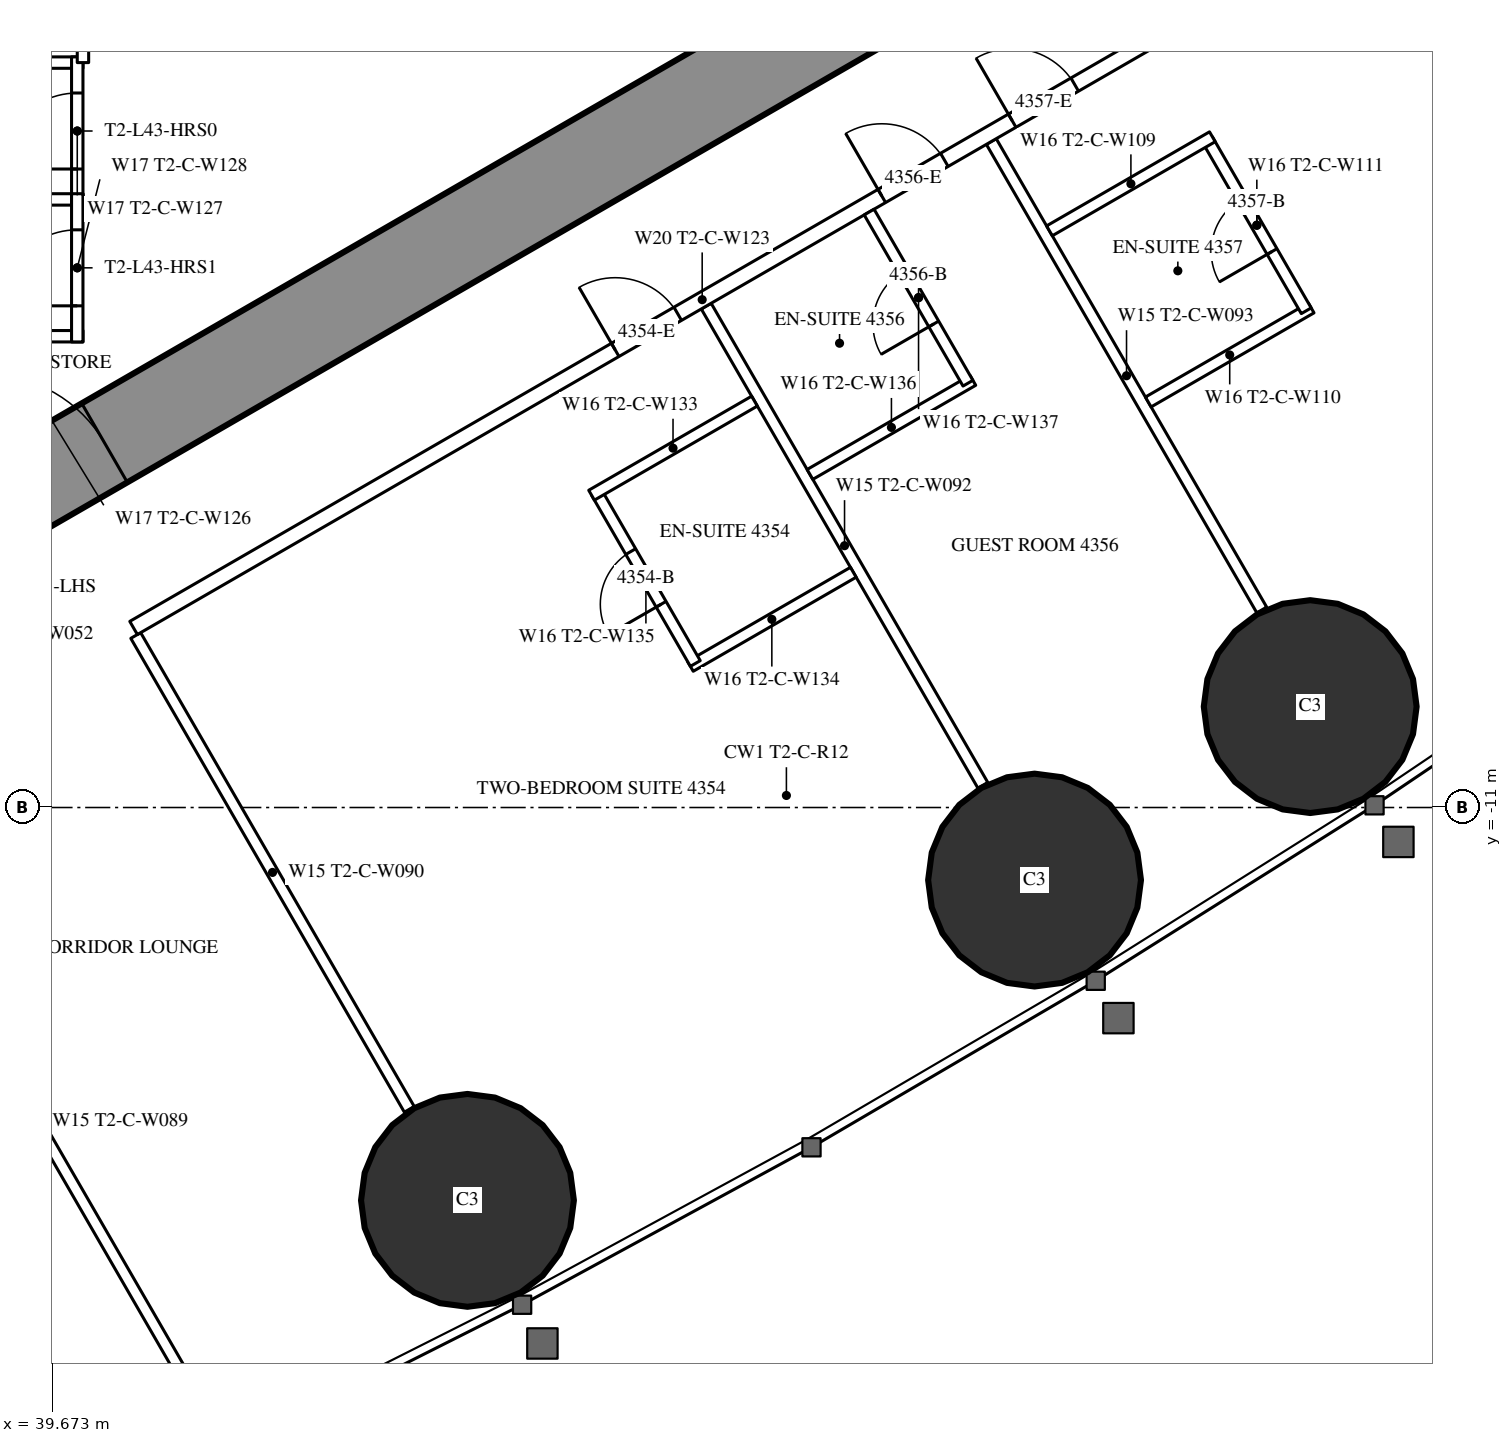
"""IFC4 building model, lengths in metres.
Left out: names, types, materials, properties, quantities, classifications, styles, units other than length and angle.
Written with IfcOpenShell. Run it as: python <this file> out.ifc"""

import sys

from ifc_helpers import new_model, si_unit, direction, frame, frame_2d, origin, origin_2d, place, context, subcontext, project, spatial, rectangle, circle, extrude, element, fill, save


model = new_model("IFC4")
c1 = context("Model", 3, precision=1e-05, world=origin(), true_north=direction((0.0, 1.0)))
c2 = subcontext(c1, "Body", "Model", "MODEL_VIEW")
j1 = project(units=[si_unit("LENGTHUNIT", "METRE"), si_unit("PLANEANGLEUNIT", "RADIAN")], contexts=[c1])
p1 = place(None, origin())
s1 = spatial("IfcSite", under=j1, at=p1, CompositionType="ELEMENT")
p2 = place(p1, origin())
s2 = spatial("IfcBuilding", under=s1, at=p2, CompositionType="ELEMENT")
p3 = place(p2, frame((0.0, 0.0, 163.3)))
s3 = spatial("IfcBuildingStorey", under=s2, at=p3, CompositionType="ELEMENT", Elevation=163.3)
for number, where, z_axis, x_axis in (
    (1, (45.134, -16.168, 0.0), (0.0, 0.0, 1.0), (1.0, 0.0, 0.0)),
    (2, (52.594, -11.955, 0.0), (0.0, 0.0, 1.0), (1.0, 0.0, 0.0)),
    (3, (56.221, -9.672, 0.0), (0.0, 0.0, 1.0), (1.0, 0.0, 0.0)),
):
    element("IfcColumn", number, at=place(p3, frame(where, z_axis=z_axis, x_axis=x_axis)), inside=s3, PredefinedType="COLUMN", context=c2, shape_type="SweptSolid", body=[
        extrude(circle(Radius=1.4, at=origin_2d()), origin(), (0.0, 0.0, 1.0), 3.5),
    ])
p4 = place(p3, frame((27.2, -13.8, 0.0), z_axis=(0.0, 0.0, 1.0), x_axis=(0.866027159892, 0.499996958321, 0.0)))
e4 = element("IfcWall", 4, at=p4, inside=s3, PredefinedType="SHEAR", context=c2, shape_type="SweptSolid", body=[
    extrude(rectangle(XDim=27.947, YDim=1.2, at=frame_2d((13.973, 0.0))), origin(), (0.0, 0.0, 1.0), 3.5),
])
p5 = place(p4, frame((4.6, 0.0, 0.0)))
e5 = element("IfcOpeningElement", 5, at=p5, cuts=e4, PredefinedType="OPENING", context=c2, shape_type="SweptSolid", body=[
    extrude(rectangle(XDim=1.0, YDim=2.2, at=frame_2d((0.5, 1.1))), frame((0.0, 0.61, 0.0), z_axis=(0.0, -1.0, 0.0), x_axis=(1.0, 0.0, 0.0)), (0.0, 0.0, 1.0), 1.22),
])
p6 = place(p4, frame((13.395, 0.0, 0.0)))
e6 = element("IfcOpeningElement", 6, at=p6, cuts=e4, PredefinedType="OPENING", context=c2, shape_type="SweptSolid", body=[
    extrude(rectangle(XDim=1.8, YDim=2.2, at=frame_2d((0.9, 1.1))), frame((0.0, 0.61, 0.0), z_axis=(0.0, -1.0, 0.0), x_axis=(1.0, 0.0, 0.0)), (0.0, 0.0, 1.0), 1.22),
])
p7 = place(p3, frame((37.022, -10.9, 0.0), z_axis=(0.0, 0.0, 1.0), x_axis=(0.499998620953, -0.866026199976, 0.0)))
e7 = element("IfcWall", 7, at=p7, inside=s3, PredefinedType="PARTITIONING", context=c2, shape_type="SweptSolid", body=[
    extrude(rectangle(XDim=9.77, YDim=0.15, at=frame_2d((4.885, 0.0))), origin(), (0.0, 0.0, 1.0), 3.25),
])
p8 = place(p3, frame((40.769, -8.737, 0.0), z_axis=(0.0, 0.0, 1.0), x_axis=(0.500013115284, -0.866017831539, 0.0)))
e8 = element("IfcWall", 8, at=p8, inside=s3, PredefinedType="PARTITIONING", context=c2, shape_type="SweptSolid", body=[
    extrude(rectangle(XDim=7.198, YDim=0.15, at=frame_2d((3.599, 0.0))), origin(), (0.0, 0.0, 1.0), 2.3),
])
p9 = place(p3, frame((48.275, -4.404, 0.0), z_axis=(0.0, 0.0, 1.0), x_axis=(0.500006004368, -0.866021937133, 0.0)))
e9 = element("IfcWall", 9, at=p9, inside=s3, PredefinedType="PARTITIONING", context=c2, shape_type="SweptSolid", body=[
    extrude(rectangle(XDim=7.279, YDim=0.15, at=frame_2d((3.64, 0.0))), origin(), (0.0, 0.0, 1.0), 2.3),
])
p10 = place(p3, frame((52.025, -2.238, 0.0), z_axis=(0.0, 0.0, 1.0), x_axis=(0.499983785035, -0.866034765296, 0.0)))
e10 = element("IfcWall", 10, at=p10, inside=s3, PredefinedType="PARTITIONING", context=c2, shape_type="SweptSolid", body=[
    extrude(rectangle(XDim=7.116, YDim=0.15, at=frame_2d((3.558, 0.0))), origin(), (0.0, 0.0, 1.0), 2.3),
])
p11 = place(p3, frame((40.741, -8.638, 0.0), z_axis=(0.0, 0.0, 1.0), x_axis=(0.866022967338, 0.500004220025, 0.0)))
e11 = element("IfcWall", 11, at=p11, inside=s3, PredefinedType="PARTITIONING", context=c2, shape_type="SweptSolid", body=[
    extrude(rectangle(XDim=17.276, YDim=0.2, at=frame_2d((8.638, 0.0))), origin(), (0.0, 0.0, 1.0), 3.25),
])
p12 = place(p11, frame((7.316, 0.0, 0.0)))
e12 = element("IfcOpeningElement", 12, at=p12, cuts=e11, PredefinedType="OPENING", context=c2, shape_type="SweptSolid", body=[
    extrude(rectangle(XDim=0.95, YDim=2.2, at=frame_2d((0.475, 1.1))), frame((0.0, 0.11, 0.0), z_axis=(0.0, -1.0, 0.0), x_axis=(1.0, 0.0, 0.0)), (0.0, 0.0, 1.0), 0.22),
])
p13 = place(p11, frame((11.366, 0.0, 0.0)))
e13 = element("IfcOpeningElement", 13, at=p13, cuts=e11, PredefinedType="OPENING", context=c2, shape_type="SweptSolid", body=[
    extrude(rectangle(XDim=0.95, YDim=2.2, at=frame_2d((0.475, 1.1))), frame((0.0, 0.11, 0.0), z_axis=(0.0, -1.0, 0.0), x_axis=(1.0, 0.0, 0.0)), (0.0, 0.0, 1.0), 0.22),
])
p14 = place(p11, frame((13.347, 0.0, 0.0)))
e14 = element("IfcOpeningElement", 14, at=p14, cuts=e11, PredefinedType="OPENING", context=c2, shape_type="SweptSolid", body=[
    extrude(rectangle(XDim=0.95, YDim=2.2, at=frame_2d((0.475, 1.1))), frame((0.0, 0.11, 0.0), z_axis=(0.0, -1.0, 0.0), x_axis=(1.0, 0.0, 0.0)), (0.0, 0.0, 1.0), 0.22),
])
p15 = place(p3, frame((48.066, -9.143, 0.0), z_axis=(0.0, 0.0, 1.0), x_axis=(0.866006523861, 0.500032699561, 0.0)))
e15 = element("IfcWall", 15, at=p15, inside=s3, PredefinedType="PARTITIONING", context=c2, shape_type="SweptSolid", body=[
    extrude(rectangle(XDim=2.475, YDim=0.15, at=frame_2d((1.237, 0.0))), origin(), (0.0, 0.0, 1.0), 3.25),
])
p16 = place(p3, frame((46.831, -6.854, 0.0), z_axis=(0.0, 0.0, 1.0), x_axis=(0.500006934395, -0.866021400173, 0.0)))
e16 = element("IfcWall", 16, at=p16, inside=s3, PredefinedType="PARTITIONING", context=c2, shape_type="SweptSolid", body=[
    extrude(rectangle(XDim=2.6, YDim=0.15, at=frame_2d((1.3, 0.0))), origin(), (0.0, 0.0, 1.0), 3.25),
])
p17 = place(p16, frame((0.9, 0.0, 0.0)))
e17 = element("IfcOpeningElement", 17, at=p17, cuts=e16, PredefinedType="OPENING", context=c2, shape_type="SweptSolid", body=[
    extrude(rectangle(XDim=0.8, YDim=2.2, at=frame_2d((0.4, 1.1))), frame((0.0, 0.085, 0.0), z_axis=(0.0, -1.0, 0.0), x_axis=(1.0, 0.0, 0.0)), (0.0, 0.0, 1.0), 0.17),
])
for number, where, z_axis, x_axis in (
    (18, (46.766, -6.891, 0.0), (0.0, 0.0, 1.0), (0.866, 0.5, 0.0)),
    (19, (49.64, -6.618, 0.0), (0.0, 0.0, 1.0), (0.866, 0.5, 0.0)),
):
    element("IfcWall", number, at=place(p3, frame(where, z_axis=z_axis, x_axis=x_axis)), inside=s3, PredefinedType="PARTITIONING", context=c2, shape_type="SweptSolid", body=[
        extrude(rectangle(XDim=2.475, YDim=0.15, at=frame_2d((1.237, 0.0))), origin(), (0.0, 0.0, 1.0), 3.25),
    ])
p18 = place(p3, frame((50.418, -3.166, 0.0), z_axis=(0.0, 0.0, 1.0), x_axis=(0.499936506574, -0.866062058628, 0.0)))
e20 = element("IfcWall", 20, at=p18, inside=s3, PredefinedType="PARTITIONING", context=c2, shape_type="SweptSolid", body=[
    extrude(rectangle(XDim=2.6, YDim=0.15, at=frame_2d((1.3, 0.0))), origin(), (0.0, 0.0, 1.0), 3.25),
])
p19 = place(p18, frame((0.9, 0.0, 0.0)))
e21 = element("IfcOpeningElement", 21, at=p19, cuts=e20, PredefinedType="OPENING", context=c2, shape_type="SweptSolid", body=[
    extrude(rectangle(XDim=0.8, YDim=2.2, at=frame_2d((0.4, 1.1))), frame((0.0, 0.085, 0.0), z_axis=(0.0, -1.0, 0.0), x_axis=(1.0, 0.0, 0.0)), (0.0, 0.0, 1.0), 0.17),
])
p20 = place(p3, frame((54.09, -5.665, 0.0), z_axis=(0.0, 0.0, 1.0), x_axis=(0.866006523861, 0.500032699561, 0.0)))
e22 = element("IfcWall", 22, at=p20, inside=s3, PredefinedType="PARTITIONING", context=c2, shape_type="SweptSolid", body=[
    extrude(rectangle(XDim=2.475, YDim=0.15, at=frame_2d((1.237, 0.0))), origin(), (0.0, 0.0, 1.0), 3.25),
])
p21 = place(p3, frame((54.869, -2.213, 0.0), z_axis=(0.0, 0.0, 1.0), x_axis=(0.500047596559, -0.865997922154, 0.0)))
e23 = element("IfcWall", 23, at=p21, inside=s3, PredefinedType="PARTITIONING", context=c2, shape_type="SweptSolid", body=[
    extrude(rectangle(XDim=2.6, YDim=0.15, at=frame_2d((1.3, 0.0))), origin(), (0.0, 0.0, 1.0), 3.25),
])
p22 = place(p21, frame((0.9, 0.0, 0.0)))
e24 = element("IfcOpeningElement", 24, at=p22, cuts=e23, PredefinedType="OPENING", context=c2, shape_type="SweptSolid", body=[
    extrude(rectangle(XDim=0.8, YDim=2.2, at=frame_2d((0.4, 1.1))), frame((0.0, 0.085, 0.0), z_axis=(0.0, -1.0, 0.0), x_axis=(1.0, 0.0, 0.0)), (0.0, 0.0, 1.0), 0.17),
])
p23 = place(p3, frame((52.79, -3.413, 0.0), z_axis=(0.0, 0.0, 1.0), x_axis=(0.866006523861, 0.500032699561, 0.0)))
e25 = element("IfcWall", 25, at=p23, inside=s3, PredefinedType="PARTITIONING", context=c2, shape_type="SweptSolid", body=[
    extrude(rectangle(XDim=2.475, YDim=0.15, at=frame_2d((1.237, 0.0))), origin(), (0.0, 0.0, 1.0), 3.25),
])
for number, where, z_axis, x_axis in (
    (26, (37.9, -1.2, 0.0), (0.0, 0.0, 1.0), (1.0, 0.0, 0.0)),
    (27, (37.9, -3.0, 0.0), (0.0, 0.0, 1.0), (1.0, 0.0, 0.0)),
    (28, (37.9, -4.8, 0.0), (0.0, 0.0, 1.0), (1.0, 0.0, 0.0)),
):
    element("IfcWall", number, at=place(p3, frame(where, z_axis=z_axis, x_axis=x_axis)), inside=s3, PredefinedType="PARTITIONING", context=c2, shape_type="SweptSolid", body=[
        extrude(rectangle(XDim=2.175, YDim=0.15, at=frame_2d((1.087, 0.0))), origin(), (0.0, 0.0, 1.0), 3.25),
    ])
p24 = place(p3, frame((40.0, -3.075, 0.0), z_axis=(0.0, 0.0, 1.0), x_axis=(0.0, 1.0, 0.0)))
e29 = element("IfcWall", 29, at=p24, inside=s3, PredefinedType="PARTITIONING", context=c2, shape_type="SweptSolid", body=[
    extrude(rectangle(XDim=1.95, YDim=0.15, at=frame_2d((0.975, 0.0))), origin(), (0.0, 0.0, 1.0), 3.25),
])
p25 = place(p24, frame((0.475, 0.0, 0.0)))
e30 = element("IfcOpeningElement", 30, at=p25, cuts=e29, PredefinedType="OPENING", context=c2, shape_type="SweptSolid", body=[
    extrude(rectangle(XDim=1.0, YDim=2.2, at=frame_2d((0.5, 1.1))), frame((0.0, 0.085, 0.0), z_axis=(0.0, -1.0, 0.0), x_axis=(1.0, 0.0, 0.0)), (0.0, 0.0, 1.0), 0.17),
])
p26 = place(p3, frame((40.0, -4.875, 0.0), z_axis=(0.0, 0.0, 1.0), x_axis=(0.0, 1.0, 0.0)))
e31 = element("IfcWall", 31, at=p26, inside=s3, PredefinedType="PARTITIONING", context=c2, shape_type="SweptSolid", body=[
    extrude(rectangle(XDim=1.95, YDim=0.15, at=frame_2d((0.975, 0.0))), origin(), (0.0, 0.0, 1.0), 3.25),
])
p27 = place(p26, frame((0.475, 0.0, 0.0)))
e32 = element("IfcOpeningElement", 32, at=p27, cuts=e31, PredefinedType="OPENING", context=c2, shape_type="SweptSolid", body=[
    extrude(rectangle(XDim=1.0, YDim=2.2, at=frame_2d((0.5, 1.1))), frame((0.0, 0.085, 0.0), z_axis=(0.0, -1.0, 0.0), x_axis=(1.0, 0.0, 0.0)), (0.0, 0.0, 1.0), 0.17),
])
p28 = place(p3, frame((40.075, -1.2, 0.0), z_axis=(0.0, 0.0, 1.0), x_axis=(0.0, 1.0, 0.0)))
e33 = element("IfcWall", 33, at=p28, inside=s3, PredefinedType="PARTITIONING", context=c2, shape_type="SweptSolid", body=[
    extrude(rectangle(XDim=6.874, YDim=0.15, at=frame_2d((3.437, 0.0))), origin(), (0.0, 0.0, 1.0), 3.25),
])
p29 = place(p28, frame((2.537, 0.0, 0.0)))
e34 = element("IfcOpeningElement", 34, at=p29, cuts=e33, PredefinedType="OPENING", context=c2, shape_type="SweptSolid", body=[
    extrude(rectangle(XDim=1.8, YDim=2.2, at=frame_2d((0.9, 1.1))), frame((0.0, 0.085, 0.0), z_axis=(0.0, -1.0, 0.0), x_axis=(1.0, 0.0, 0.0)), (0.0, 0.0, 1.0), 0.17),
])
p30 = place(p17, origin())
e35 = element("IfcDoor", 35, at=p30, inside=s3, OperationType="SINGLE_SWING_RIGHT", PredefinedType="DOOR", context=c2, shape_type="SweptSolid", body=[
    extrude(rectangle(XDim=0.8, YDim=2.2, at=frame_2d((0.4, 1.1))), frame((0.0, 0.025, 0.0), z_axis=(0.0, -1.0, 0.0), x_axis=(1.0, 0.0, 0.0)), (0.0, 0.0, 1.0), 0.05),
])
fill(e17, e35)
p31 = place(p12, origin())
e36 = element("IfcDoor", 36, at=p31, inside=s3, OperationType="SINGLE_SWING_LEFT", PredefinedType="DOOR", context=c2, shape_type="SweptSolid", body=[
    extrude(rectangle(XDim=0.95, YDim=2.2, at=frame_2d((0.475, 1.1))), frame((0.0, 0.025, 0.0), z_axis=(0.0, -1.0, 0.0), x_axis=(1.0, 0.0, 0.0)), (0.0, 0.0, 1.0), 0.05),
])
fill(e12, e36)
p32 = place(p19, origin())
e37 = element("IfcDoor", 37, at=p32, inside=s3, OperationType="SINGLE_SWING_RIGHT", PredefinedType="DOOR", context=c2, shape_type="SweptSolid", body=[
    extrude(rectangle(XDim=0.8, YDim=2.2, at=frame_2d((0.4, 1.1))), frame((0.0, 0.025, 0.0), z_axis=(0.0, -1.0, 0.0), x_axis=(1.0, 0.0, 0.0)), (0.0, 0.0, 1.0), 0.05),
])
fill(e21, e37)
p33 = place(p13, origin())
e38 = element("IfcDoor", 38, at=p33, inside=s3, OperationType="SINGLE_SWING_LEFT", PredefinedType="DOOR", context=c2, shape_type="SweptSolid", body=[
    extrude(rectangle(XDim=0.95, YDim=2.2, at=frame_2d((0.475, 1.1))), frame((0.0, 0.025, 0.0), z_axis=(0.0, -1.0, 0.0), x_axis=(1.0, 0.0, 0.0)), (0.0, 0.0, 1.0), 0.05),
])
fill(e13, e38)
p34 = place(p22, origin())
e39 = element("IfcDoor", 39, at=p34, inside=s3, OperationType="SINGLE_SWING_RIGHT", PredefinedType="DOOR", context=c2, shape_type="SweptSolid", body=[
    extrude(rectangle(XDim=0.8, YDim=2.2, at=frame_2d((0.4, 1.1))), frame((0.0, 0.025, 0.0), z_axis=(0.0, -1.0, 0.0), x_axis=(1.0, 0.0, 0.0)), (0.0, 0.0, 1.0), 0.05),
])
fill(e24, e39)
p35 = place(p14, origin())
e40 = element("IfcDoor", 40, at=p35, inside=s3, OperationType="SINGLE_SWING_LEFT", PredefinedType="DOOR", context=c2, shape_type="SweptSolid", body=[
    extrude(rectangle(XDim=0.95, YDim=2.2, at=frame_2d((0.475, 1.1))), frame((0.0, 0.025, 0.0), z_axis=(0.0, -1.0, 0.0), x_axis=(1.0, 0.0, 0.0)), (0.0, 0.0, 1.0), 0.05),
])
fill(e14, e40)
p36 = place(p25, origin())
e41 = element("IfcDoor", 41, at=p36, inside=s3, OperationType="SINGLE_SWING_LEFT", PredefinedType="DOOR", context=c2, shape_type="SweptSolid", body=[
    extrude(rectangle(XDim=1.0, YDim=2.2, at=frame_2d((0.5, 1.1))), frame((0.0, 0.025, 0.0), z_axis=(0.0, -1.0, 0.0), x_axis=(1.0, 0.0, 0.0)), (0.0, 0.0, 1.0), 0.05),
])
fill(e30, e41)
p37 = place(p27, origin())
e42 = element("IfcDoor", 42, at=p37, inside=s3, OperationType="SINGLE_SWING_LEFT", PredefinedType="DOOR", context=c2, shape_type="SweptSolid", body=[
    extrude(rectangle(XDim=1.0, YDim=2.2, at=frame_2d((0.5, 1.1))), frame((0.0, 0.025, 0.0), z_axis=(0.0, -1.0, 0.0), x_axis=(1.0, 0.0, 0.0)), (0.0, 0.0, 1.0), 0.05),
])
fill(e32, e42)
p38 = place(p6, origin())
e43 = element("IfcDoor", 43, at=p38, inside=s3, OperationType="DOUBLE_DOOR_SINGLE_SWING", PredefinedType="DOOR", context=c2, shape_type="SweptSolid", body=[
    extrude(rectangle(XDim=1.8, YDim=2.2, at=frame_2d((0.9, 1.1))), frame((0.0, 0.025, 0.0), z_axis=(0.0, -1.0, 0.0), x_axis=(1.0, 0.0, 0.0)), (0.0, 0.0, 1.0), 0.05),
])
fill(e6, e43)
save(model, sys.argv[1])
